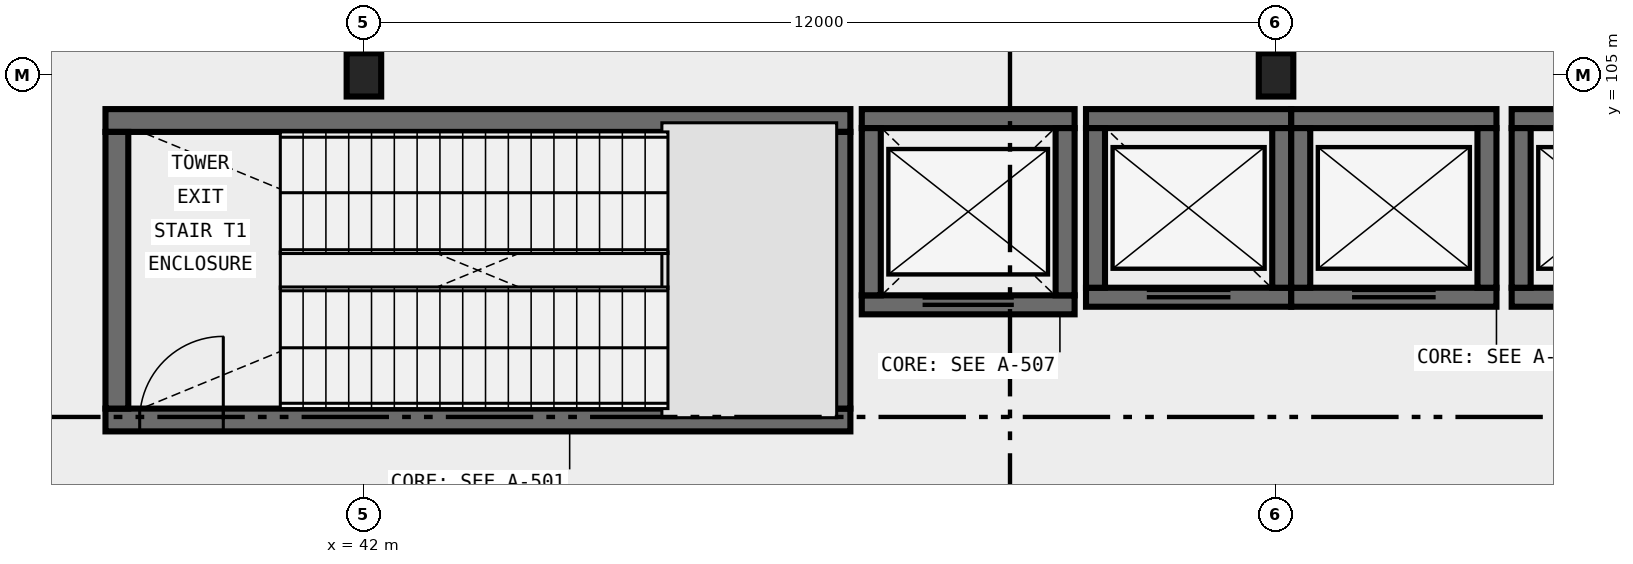
"""IFC4 building model, lengths in metres.
Left out: names, types, materials, properties, quantities, classifications, styles, units other than length and angle.
Written with IfcOpenShell. Run it as: python <this file> out.ifc"""

import sys

from ifc_helpers import new_model, si_unit, direction, frame, frame_2d, origin, origin_2d, place, context, subcontext, project, spatial, rectangle, i_section, extrude, element, fill, save


model = new_model("IFC4")
c1 = context("Model", 3, precision=1e-05, world=origin(), true_north=direction((0.0, 1.0)))
c2 = subcontext(c1, "Body", "Model", "MODEL_VIEW")
j1 = project(units=[si_unit("LENGTHUNIT", "METRE"), si_unit("PLANEANGLEUNIT", "RADIAN")], contexts=[c1])
p1 = place(None, origin())
s1 = spatial("IfcSite", under=j1, at=p1, CompositionType="ELEMENT")
p2 = place(p1, origin())
s2 = spatial("IfcBuilding", under=s1, at=p2, CompositionType="ELEMENT")
p3 = place(p2, origin())
s3 = spatial("IfcBuildingStorey", under=s2, at=p3, CompositionType="ELEMENT", Elevation=0.0)
for number, where, z_axis, x_axis in (
    (1, (42.0, 105.0, 0.0), (0.0, 0.0, 1.0), (1.0, 0.0, 0.0)),
    (2, (54.0, 105.0, 0.0), (0.0, 0.0, 1.0), (1.0, 0.0, 0.0)),
):
    element("IfcColumn", number, at=place(p3, frame(where, z_axis=z_axis, x_axis=x_axis)), inside=s3, PredefinedType="COLUMN", context=c2, shape_type="SweptSolid", body=[
        extrude(i_section(OverallWidth=0.454, OverallDepth=0.569, WebThickness=0.078, FlangeThickness=0.125, FilletRadius=0.031, at=origin_2d()), origin(), (0.0, 0.0, 1.0), 6.0),
    ])
p4 = place(p3, frame((38.6, 100.46, 0.0), z_axis=(0.0, 0.0, 1.0), x_axis=(1.0, 0.0, 0.0)))
e3 = element("IfcWall", 3, at=p4, inside=s3, PredefinedType="SHEAR", context=c2, shape_type="SweptSolid", body=[
    extrude(rectangle(XDim=9.8, YDim=0.3, at=frame_2d((4.9, 0.0))), origin(), (0.0, 0.0, 1.0), 6.0),
])
p5 = place(p4, frame((0.45, 0.0, 0.0)))
e4 = element("IfcOpeningElement", 4, at=p5, cuts=e3, PredefinedType="OPENING", context=c2, shape_type="SweptSolid", body=[
    extrude(rectangle(XDim=1.1, YDim=2.2, at=frame_2d((0.55, 1.1))), frame((0.0, 0.165, 0.0), z_axis=(0.0, -1.0, 0.0), x_axis=(1.0, 0.0, 0.0)), (0.0, 0.0, 1.0), 0.33),
])
p6 = place(p3, frame((48.4, 104.4, 0.0), z_axis=(0.0, 0.0, 1.0), x_axis=(-1.0, 0.0, 0.0)))
e5 = element("IfcWall", 5, at=p6, inside=s3, PredefinedType="SHEAR", context=c2, shape_type="SweptSolid", body=[
    extrude(rectangle(XDim=9.8, YDim=0.3, at=frame_2d((4.9, 0.0))), origin(), (0.0, 0.0, 1.0), 6.0),
])
for number, where, z_axis, x_axis in (
    (6, (38.75, 104.25, 0.0), (0.0, 0.0, 1.0), (0.0, -1.0, 0.0)),
    (7, (48.25, 100.61, 0.0), (0.0, 0.0, 1.0), (0.0, 1.0, 0.0)),
):
    element("IfcWall", number, at=place(p3, frame(where, z_axis=z_axis, x_axis=x_axis)), inside=s3, PredefinedType="SHEAR", context=c2, shape_type="SweptSolid", body=[
        extrude(rectangle(XDim=3.64, YDim=0.3, at=frame_2d((1.82, 0.0))), origin(), (0.0, 0.0, 1.0), 6.0),
    ])
p7 = place(p3, frame((48.55, 101.975, 0.0), z_axis=(0.0, 0.0, 1.0), x_axis=(1.0, 0.0, 0.0)))
e8 = element("IfcWall", 8, at=p7, inside=s3, PredefinedType="SHEAR", context=c2, shape_type="SweptSolid", body=[
    extrude(rectangle(XDim=2.8, YDim=0.25, at=frame_2d((1.4, 0.0))), origin(), (0.0, 0.0, 1.0), 6.0),
])
p8 = place(p7, frame((0.8, 0.0, 0.0)))
e9 = element("IfcOpeningElement", 9, at=p8, cuts=e8, PredefinedType="OPENING", context=c2, shape_type="SweptSolid", body=[
    extrude(rectangle(XDim=1.2, YDim=2.2, at=frame_2d((0.6, 1.1))), frame((0.0, 0.14, 0.0), z_axis=(0.0, -1.0, 0.0), x_axis=(1.0, 0.0, 0.0)), (0.0, 0.0, 1.0), 0.28),
])
p9 = place(p3, frame((51.35, 104.425, 0.0), z_axis=(0.0, 0.0, 1.0), x_axis=(-1.0, 0.0, 0.0)))
e10 = element("IfcWall", 10, at=p9, inside=s3, PredefinedType="SHEAR", context=c2, shape_type="SweptSolid", body=[
    extrude(rectangle(XDim=2.8, YDim=0.25, at=frame_2d((1.4, 0.0))), origin(), (0.0, 0.0, 1.0), 6.0),
])
for number, where, z_axis, x_axis in (
    (11, (48.675, 104.3, 0.0), (0.0, 0.0, 1.0), (0.0, -1.0, 0.0)),
    (12, (51.225, 102.1, 0.0), (0.0, 0.0, 1.0), (0.0, 1.0, 0.0)),
):
    element("IfcWall", number, at=place(p3, frame(where, z_axis=z_axis, x_axis=x_axis)), inside=s3, PredefinedType="SHEAR", context=c2, shape_type="SweptSolid", body=[
        extrude(rectangle(XDim=2.2, YDim=0.25, at=frame_2d((1.1, 0.0))), origin(), (0.0, 0.0, 1.0), 6.0),
    ])
p10 = place(p3, frame((51.5, 102.075, 0.0), z_axis=(0.0, 0.0, 1.0), x_axis=(1.0, 0.0, 0.0)))
e13 = element("IfcWall", 13, at=p10, inside=s3, PredefinedType="SHEAR", context=c2, shape_type="SweptSolid", body=[
    extrude(rectangle(XDim=2.7, YDim=0.25, at=frame_2d((1.35, 0.0))), origin(), (0.0, 0.0, 1.0), 6.0),
])
p11 = place(p10, frame((0.8, 0.0, 0.0)))
e14 = element("IfcOpeningElement", 14, at=p11, cuts=e13, PredefinedType="OPENING", context=c2, shape_type="SweptSolid", body=[
    extrude(rectangle(XDim=1.1, YDim=2.2, at=frame_2d((0.55, 1.1))), frame((0.0, 0.14, 0.0), z_axis=(0.0, -1.0, 0.0), x_axis=(1.0, 0.0, 0.0)), (0.0, 0.0, 1.0), 0.28),
])
p12 = place(p3, frame((54.2, 104.425, 0.0), z_axis=(0.0, 0.0, 1.0), x_axis=(-1.0, 0.0, 0.0)))
e15 = element("IfcWall", 15, at=p12, inside=s3, PredefinedType="SHEAR", context=c2, shape_type="SweptSolid", body=[
    extrude(rectangle(XDim=2.7, YDim=0.25, at=frame_2d((1.35, 0.0))), origin(), (0.0, 0.0, 1.0), 6.0),
])
for number, where, z_axis, x_axis in (
    (16, (51.625, 104.3, 0.0), (0.0, 0.0, 1.0), (0.0, -1.0, 0.0)),
    (17, (54.075, 102.2, 0.0), (0.0, 0.0, 1.0), (0.0, 1.0, 0.0)),
):
    element("IfcWall", number, at=place(p3, frame(where, z_axis=z_axis, x_axis=x_axis)), inside=s3, PredefinedType="SHEAR", context=c2, shape_type="SweptSolid", body=[
        extrude(rectangle(XDim=2.1, YDim=0.25, at=frame_2d((1.05, 0.0))), origin(), (0.0, 0.0, 1.0), 6.0),
    ])
p13 = place(p3, frame((54.2, 102.075, 0.0), z_axis=(0.0, 0.0, 1.0), x_axis=(1.0, 0.0, 0.0)))
e18 = element("IfcWall", 18, at=p13, inside=s3, PredefinedType="SHEAR", context=c2, shape_type="SweptSolid", body=[
    extrude(rectangle(XDim=2.7, YDim=0.25, at=frame_2d((1.35, 0.0))), origin(), (0.0, 0.0, 1.0), 6.0),
])
p14 = place(p13, frame((0.8, 0.0, 0.0)))
e19 = element("IfcOpeningElement", 19, at=p14, cuts=e18, PredefinedType="OPENING", context=c2, shape_type="SweptSolid", body=[
    extrude(rectangle(XDim=1.1, YDim=2.2, at=frame_2d((0.55, 1.1))), frame((0.0, 0.14, 0.0), z_axis=(0.0, -1.0, 0.0), x_axis=(1.0, 0.0, 0.0)), (0.0, 0.0, 1.0), 0.28),
])
p15 = place(p3, frame((56.9, 104.425, 0.0), z_axis=(0.0, 0.0, 1.0), x_axis=(-1.0, 0.0, 0.0)))
e20 = element("IfcWall", 20, at=p15, inside=s3, PredefinedType="SHEAR", context=c2, shape_type="SweptSolid", body=[
    extrude(rectangle(XDim=2.7, YDim=0.25, at=frame_2d((1.35, 0.0))), origin(), (0.0, 0.0, 1.0), 6.0),
])
for number, where, z_axis, x_axis in (
    (21, (54.325, 104.3, 0.0), (0.0, 0.0, 1.0), (0.0, -1.0, 0.0)),
    (22, (56.775, 102.2, 0.0), (0.0, 0.0, 1.0), (0.0, 1.0, 0.0)),
):
    element("IfcWall", number, at=place(p3, frame(where, z_axis=z_axis, x_axis=x_axis)), inside=s3, PredefinedType="SHEAR", context=c2, shape_type="SweptSolid", body=[
        extrude(rectangle(XDim=2.1, YDim=0.25, at=frame_2d((1.05, 0.0))), origin(), (0.0, 0.0, 1.0), 6.0),
    ])
p16 = place(p3, frame((57.1, 102.075, 0.0), z_axis=(0.0, 0.0, 1.0), x_axis=(1.0, 0.0, 0.0)))
e23 = element("IfcWall", 23, at=p16, inside=s3, PredefinedType="SHEAR", context=c2, shape_type="SweptSolid", body=[
    extrude(rectangle(XDim=2.7, YDim=0.25, at=frame_2d((1.35, 0.0))), origin(), (0.0, 0.0, 1.0), 6.0),
])
p17 = place(p16, frame((0.8, 0.0, 0.0)))
e24 = element("IfcOpeningElement", 24, at=p17, cuts=e23, PredefinedType="OPENING", context=c2, shape_type="SweptSolid", body=[
    extrude(rectangle(XDim=1.1, YDim=2.2, at=frame_2d((0.55, 1.1))), frame((0.0, 0.14, 0.0), z_axis=(0.0, -1.0, 0.0), x_axis=(1.0, 0.0, 0.0)), (0.0, 0.0, 1.0), 0.28),
])
p18 = place(p3, frame((59.8, 104.425, 0.0), z_axis=(0.0, 0.0, 1.0), x_axis=(-1.0, 0.0, 0.0)))
e25 = element("IfcWall", 25, at=p18, inside=s3, PredefinedType="SHEAR", context=c2, shape_type="SweptSolid", body=[
    extrude(rectangle(XDim=2.7, YDim=0.25, at=frame_2d((1.35, 0.0))), origin(), (0.0, 0.0, 1.0), 6.0),
])
p19 = place(p3, frame((57.225, 104.3, 0.0), z_axis=(0.0, 0.0, 1.0), x_axis=(0.0, -1.0, 0.0)))
e26 = element("IfcWall", 26, at=p19, inside=s3, PredefinedType="SHEAR", context=c2, shape_type="SweptSolid", body=[
    extrude(rectangle(XDim=2.1, YDim=0.25, at=frame_2d((1.05, 0.0))), origin(), (0.0, 0.0, 1.0), 6.0),
])
p20 = place(p5, origin())
e27 = element("IfcDoor", 27, at=p20, inside=s3, OperationType="SINGLE_SWING_RIGHT", PredefinedType="DOOR", context=c2, shape_type="SweptSolid", body=[
    extrude(rectangle(XDim=1.1, YDim=2.2, at=frame_2d((0.55, 1.1))), frame((0.0, 0.025, 0.0), z_axis=(0.0, -1.0, 0.0), x_axis=(1.0, 0.0, 0.0)), (0.0, 0.0, 1.0), 0.05),
])
fill(e4, e27)
p21 = place(p8, origin())
e28 = element("IfcDoor", 28, at=p21, inside=s3, OperationType="DOUBLE_DOOR_SLIDING", PredefinedType="DOOR", context=c2, shape_type="SweptSolid", body=[
    extrude(rectangle(XDim=1.2, YDim=2.2, at=frame_2d((0.6, 1.1))), frame((0.0, 0.025, 0.0), z_axis=(0.0, -1.0, 0.0), x_axis=(1.0, 0.0, 0.0)), (0.0, 0.0, 1.0), 0.05),
])
fill(e9, e28)
p22 = place(p11, origin())
e29 = element("IfcDoor", 29, at=p22, inside=s3, OperationType="DOUBLE_DOOR_SLIDING", PredefinedType="DOOR", context=c2, shape_type="SweptSolid", body=[
    extrude(rectangle(XDim=1.1, YDim=2.2, at=frame_2d((0.55, 1.1))), frame((0.0, 0.025, 0.0), z_axis=(0.0, -1.0, 0.0), x_axis=(1.0, 0.0, 0.0)), (0.0, 0.0, 1.0), 0.05),
])
fill(e14, e29)
p23 = place(p14, origin())
e30 = element("IfcDoor", 30, at=p23, inside=s3, OperationType="DOUBLE_DOOR_SLIDING", PredefinedType="DOOR", context=c2, shape_type="SweptSolid", body=[
    extrude(rectangle(XDim=1.1, YDim=2.2, at=frame_2d((0.55, 1.1))), frame((0.0, 0.025, 0.0), z_axis=(0.0, -1.0, 0.0), x_axis=(1.0, 0.0, 0.0)), (0.0, 0.0, 1.0), 0.05),
])
fill(e19, e30)
save(model, sys.argv[1])
